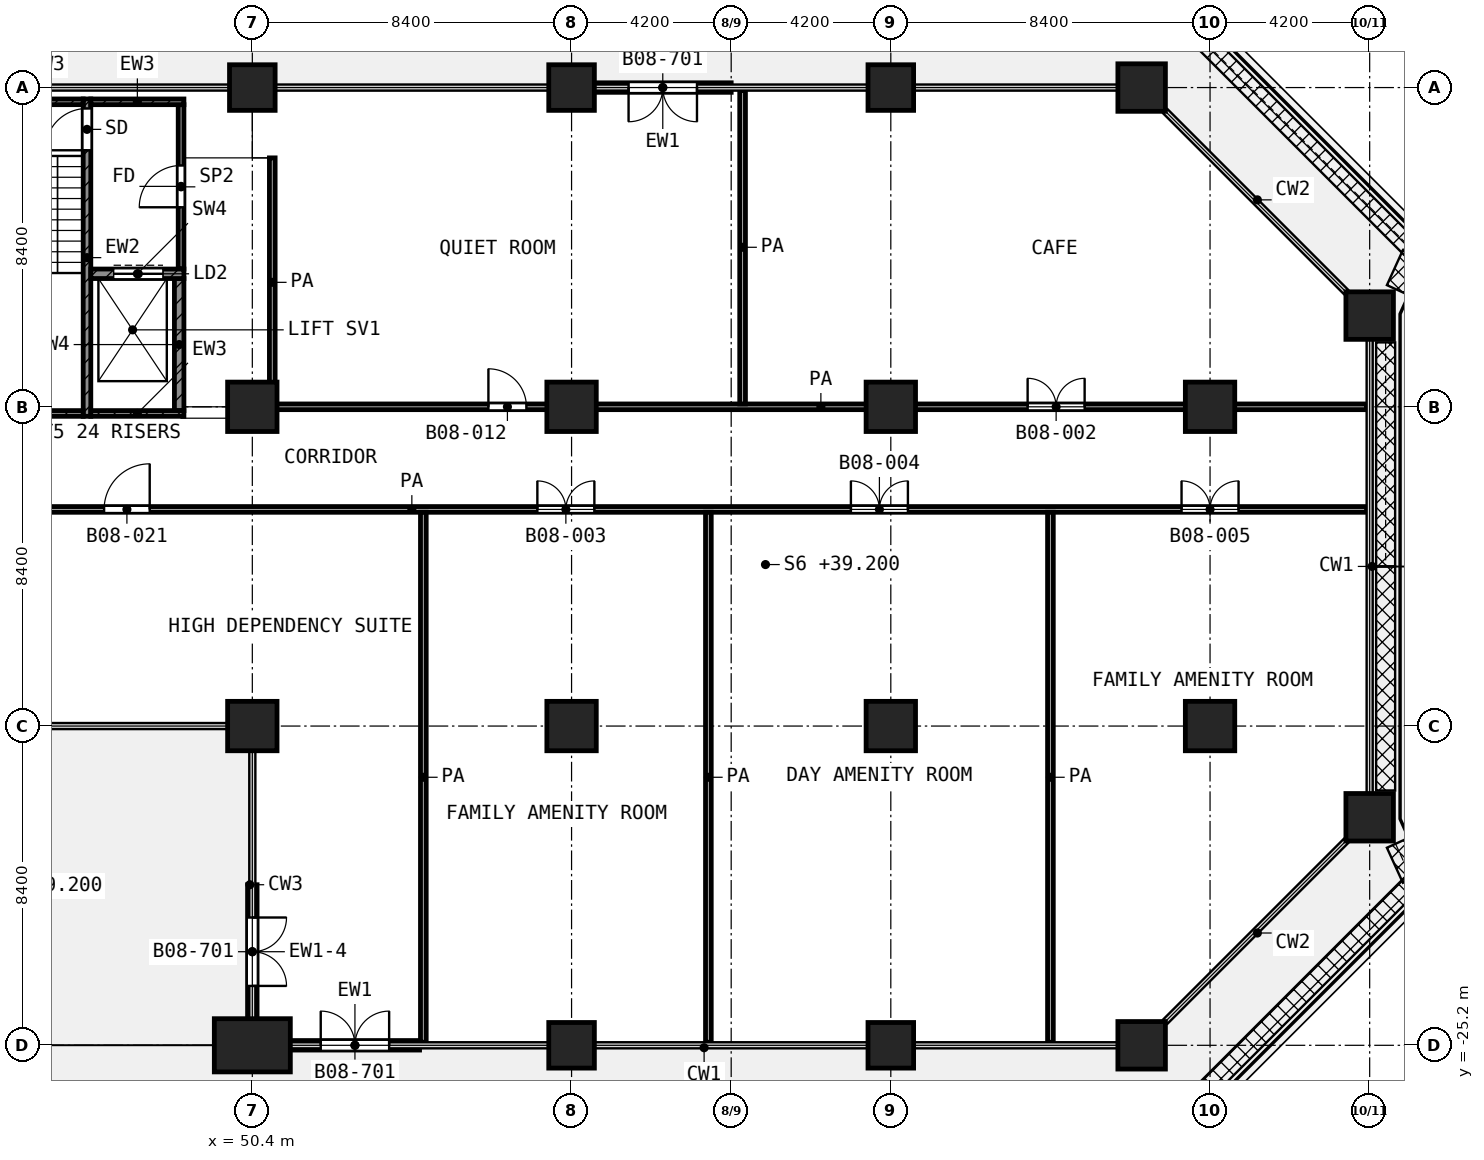
"""IFC4 building model, lengths in metres.
Left out: names, types, materials, properties, quantities, classifications, styles, units other than length and angle.
Written with IfcOpenShell. Run it as: python <this file> out.ifc"""

import sys

from ifc_helpers import new_model, si_unit, direction, frame, frame_2d, origin, origin_2d, place, context, subcontext, project, spatial, rectangle, extrude, element, fill, save


model = new_model("IFC4")
c1 = context("Model", 3, precision=1e-05, world=origin(), true_north=direction((0.0, 1.0)))
c2 = subcontext(c1, "Body", "Model", "MODEL_VIEW")
j1 = project(units=[si_unit("LENGTHUNIT", "METRE"), si_unit("PLANEANGLEUNIT", "RADIAN")], contexts=[c1])
p1 = place(None, origin())
s1 = spatial("IfcSite", under=j1, at=p1, CompositionType="ELEMENT")
p2 = place(p1, origin())
s2 = spatial("IfcBuilding", under=s1, at=p2, CompositionType="ELEMENT")
p3 = place(p2, frame((0.0, 0.0, 39.2)))
s3 = spatial("IfcBuildingStorey", under=s2, at=p3, CompositionType="ELEMENT", Elevation=39.2)
for number, where, z_axis, x_axis in (
    (1, (50.4, 0.0, 0.0), (0.0, 0.0, 1.0), (1.0, 0.0, 0.0)),
    (2, (58.8, 0.0, 0.0), (0.0, 0.0, 1.0), (1.0, 0.0, 0.0)),
    (3, (67.2, 0.0, 0.0), (0.0, 0.0, 1.0), (1.0, 0.0, 0.0)),
):
    element("IfcColumn", number, at=place(p3, frame(where, z_axis=z_axis, x_axis=x_axis)), inside=s3, PredefinedType="COLUMN", context=c2, shape_type="SweptSolid", body=[
        extrude(rectangle(XDim=1.2, YDim=1.2, at=origin_2d()), origin(), (0.0, 0.0, 1.0), 4.2),
    ])
for number, where, z_axis, x_axis in (
    (4, (73.8, 0.0, 0.0), (0.0, 0.0, 1.0), (1.0, 0.0, 0.0)),
    (5, (79.8, -6.0, 0.0), (0.0, 0.0, 1.0), (1.0, 0.0, 0.0)),
):
    element("IfcColumn", number, at=place(p3, frame(where, z_axis=z_axis, x_axis=x_axis)), inside=s3, PredefinedType="COLUMN", context=c2, shape_type="SweptSolid", body=[
        extrude(rectangle(XDim=1.25, YDim=1.25, at=origin_2d()), origin(), (0.0, 0.0, 1.0), 4.2),
    ])
for number, where, z_axis, x_axis in (
    (6, (50.4, -8.4, 0.0), (0.0, 0.0, 1.0), (1.0, 0.0, 0.0)),
    (7, (58.8, -8.4, 0.0), (0.0, 0.0, 1.0), (1.0, 0.0, 0.0)),
    (8, (67.2, -8.4, 0.0), (0.0, 0.0, 1.0), (1.0, 0.0, 0.0)),
    (9, (75.6, -8.4, 0.0), (0.0, 0.0, 1.0), (1.0, 0.0, 0.0)),
    (10, (50.4, -16.8, 0.0), (0.0, 0.0, 1.0), (1.0, 0.0, 0.0)),
    (11, (58.8, -16.8, 0.0), (0.0, 0.0, 1.0), (1.0, 0.0, 0.0)),
    (12, (67.2, -16.8, 0.0), (0.0, 0.0, 1.0), (1.0, 0.0, 0.0)),
    (13, (75.6, -16.8, 0.0), (0.0, 0.0, 1.0), (1.0, 0.0, 0.0)),
):
    element("IfcColumn", number, at=place(p3, frame(where, z_axis=z_axis, x_axis=x_axis)), inside=s3, PredefinedType="COLUMN", context=c2, shape_type="SweptSolid", body=[
        extrude(rectangle(XDim=1.3, YDim=1.3, at=origin_2d()), origin(), (0.0, 0.0, 1.0), 4.2),
    ])
p4 = place(p3, frame((79.8, -19.2, 0.0), z_axis=(0.0, 0.0, 1.0), x_axis=(1.0, 0.0, 0.0)))
e14 = element("IfcColumn", 14, at=p4, inside=s3, PredefinedType="COLUMN", context=c2, shape_type="SweptSolid", body=[
    extrude(rectangle(XDim=1.25, YDim=1.25, at=origin_2d()), origin(), (0.0, 0.0, 1.0), 4.2),
])
p5 = place(p3, frame((50.4, -25.2, 0.0), z_axis=(0.0, 0.0, 1.0), x_axis=(-1.0, 0.0, 0.0)))
e15 = element("IfcColumn", 15, at=p5, inside=s3, PredefinedType="COLUMN", context=c2, shape_type="SweptSolid", body=[
    extrude(rectangle(XDim=2.0, YDim=1.4, at=origin_2d()), origin(), (0.0, 0.0, 1.0), 4.2),
])
for number, where, z_axis, x_axis in (
    (16, (58.8, -25.2, 0.0), (0.0, 0.0, 1.0), (1.0, 0.0, 0.0)),
    (17, (67.2, -25.2, 0.0), (0.0, 0.0, 1.0), (1.0, 0.0, 0.0)),
):
    element("IfcColumn", number, at=place(p3, frame(where, z_axis=z_axis, x_axis=x_axis)), inside=s3, PredefinedType="COLUMN", context=c2, shape_type="SweptSolid", body=[
        extrude(rectangle(XDim=1.2, YDim=1.2, at=origin_2d()), origin(), (0.0, 0.0, 1.0), 4.2),
    ])
p6 = place(p3, frame((73.8, -25.2, 0.0), z_axis=(0.0, 0.0, 1.0), x_axis=(1.0, 0.0, 0.0)))
e18 = element("IfcColumn", 18, at=p6, inside=s3, PredefinedType="COLUMN", context=c2, shape_type="SweptSolid", body=[
    extrude(rectangle(XDim=1.25, YDim=1.25, at=origin_2d()), origin(), (0.0, 0.0, 1.0), 4.2),
])
p7 = place(p3, frame((50.4, -20.975, 0.0), z_axis=(0.0, 0.0, 1.0), x_axis=(0.0, -1.0, 0.0)))
e19 = element("IfcWall", 19, at=p7, inside=s3, PredefinedType="SOLIDWALL", context=c2, shape_type="SweptSolid", body=[
    extrude(rectangle(XDim=3.525, YDim=0.25, at=frame_2d((1.762, 0.0))), origin(), (0.0, 0.0, 1.0), 3.76),
])
p8 = place(p7, frame((0.863, 0.0, 0.0)))
e20 = element("IfcOpeningElement", 20, at=p8, cuts=e19, PredefinedType="OPENING", context=c2, shape_type="SweptSolid", body=[
    extrude(rectangle(XDim=1.8, YDim=2.1, at=frame_2d((0.9, 1.05))), frame((0.0, 0.135, 0.0), z_axis=(0.0, -1.0, 0.0), x_axis=(1.0, 0.0, 0.0)), (0.0, 0.0, 1.0), 0.27),
])
p9 = place(p3, frame((51.4, -25.2, 0.0), z_axis=(0.0, 0.0, 1.0), x_axis=(1.0, 0.0, 0.0)))
e21 = element("IfcWall", 21, at=p9, inside=s3, PredefinedType="SOLIDWALL", context=c2, shape_type="SweptSolid", body=[
    extrude(rectangle(XDim=3.4, YDim=0.25, at=frame_2d((1.7, 0.0))), origin(), (0.0, 0.0, 1.0), 3.78),
])
p10 = place(p9, frame((0.8, 0.0, 0.0)))
e22 = element("IfcOpeningElement", 22, at=p10, cuts=e21, PredefinedType="OPENING", context=c2, shape_type="SweptSolid", body=[
    extrude(rectangle(XDim=1.8, YDim=2.1, at=frame_2d((0.9, 1.05))), frame((0.0, 0.135, 0.0), z_axis=(0.0, -1.0, 0.0), x_axis=(1.0, 0.0, 0.0)), (0.0, 0.0, 1.0), 0.27),
])
p11 = place(p3, frame((63.0, 0.0, 0.0), z_axis=(0.0, 0.0, 1.0), x_axis=(-1.0, 0.0, 0.0)))
e23 = element("IfcWall", 23, at=p11, inside=s3, PredefinedType="SOLIDWALL", context=c2, shape_type="SweptSolid", body=[
    extrude(rectangle(XDim=3.6, YDim=0.25, at=frame_2d((1.8, 0.0))), origin(), (0.0, 0.0, 1.0), 3.78),
])
p12 = place(p11, frame((0.9, 0.0, 0.0)))
e24 = element("IfcOpeningElement", 24, at=p12, cuts=e23, PredefinedType="OPENING", context=c2, shape_type="SweptSolid", body=[
    extrude(rectangle(XDim=1.8, YDim=2.1, at=frame_2d((0.9, 1.05))), frame((0.0, 0.135, 0.0), z_axis=(0.0, -1.0, 0.0), x_axis=(1.0, 0.0, 0.0)), (0.0, 0.0, 1.0), 0.27),
])
p13 = place(p3, frame((46.05, -8.65, 0.0), z_axis=(0.0, 0.0, 1.0), x_axis=(0.0, 1.0, 0.0)))
e25 = element("IfcWall", 25, at=p13, inside=s3, PredefinedType="SHEAR", context=c2, shape_type="SweptSolid", body=[
    extrude(rectangle(XDim=8.35, YDim=0.2, at=frame_2d((4.175, 0.0))), origin(), (0.0, 0.0, 1.0), 3.9),
])
p14 = place(p13, frame((7.0, 0.0, 0.0)))
e26 = element("IfcOpeningElement", 26, at=p14, cuts=e25, PredefinedType="OPENING", context=c2, shape_type="SweptSolid", body=[
    extrude(rectangle(XDim=1.1, YDim=2.1, at=frame_2d((0.55, 1.05))), frame((0.0, 0.11, 0.0), z_axis=(0.0, -1.0, 0.0), x_axis=(1.0, 0.0, 0.0)), (0.0, 0.0, 1.0), 0.22),
])
p15 = place(p3, frame((43.1, -0.375, 0.0), z_axis=(0.0, 0.0, 1.0), x_axis=(1.0, 0.0, 0.0)))
e27 = element("IfcWall", 27, at=p15, inside=s3, PredefinedType="SHEAR", context=c2, shape_type="SweptSolid", body=[
    extrude(rectangle(XDim=2.85, YDim=0.15, at=frame_2d((1.425, 0.0))), origin(), (0.0, 0.0, 1.0), 3.9),
])
p16 = place(p3, frame((46.15, -0.375, 0.0), z_axis=(0.0, 0.0, 1.0), x_axis=(1.0, 0.0, 0.0)))
e28 = element("IfcWall", 28, at=p16, inside=s3, PredefinedType="SHEAR", context=c2, shape_type="SweptSolid", body=[
    extrude(rectangle(XDim=2.45, YDim=0.15, at=frame_2d((1.225, 0.0))), origin(), (0.0, 0.0, 1.0), 3.9),
])
p17 = place(p3, frame((43.1, -8.575, 0.0), z_axis=(0.0, 0.0, 1.0), x_axis=(1.0, 0.0, 0.0)))
e29 = element("IfcWall", 29, at=p17, inside=s3, PredefinedType="SHEAR", context=c2, shape_type="SweptSolid", body=[
    extrude(rectangle(XDim=2.85, YDim=0.15, at=frame_2d((1.425, 0.0))), origin(), (0.0, 0.0, 1.0), 3.9),
])
p18 = place(p3, frame((46.15, -8.575, 0.0), z_axis=(0.0, 0.0, 1.0), x_axis=(1.0, 0.0, 0.0)))
e30 = element("IfcWall", 30, at=p18, inside=s3, PredefinedType="SHEAR", context=c2, shape_type="SweptSolid", body=[
    extrude(rectangle(XDim=2.45, YDim=0.15, at=frame_2d((1.225, 0.0))), origin(), (0.0, 0.0, 1.0), 3.9),
])
p19 = place(p3, frame((46.15, -4.9, 0.0), z_axis=(0.0, 0.0, 1.0), x_axis=(1.0, 0.0, 0.0)))
e31 = element("IfcWall", 31, at=p19, inside=s3, PredefinedType="SHEAR", context=c2, shape_type="SweptSolid", body=[
    extrude(rectangle(XDim=2.45, YDim=0.25, at=frame_2d((1.225, 0.0))), origin(), (0.0, 0.0, 1.0), 3.9),
])
p20 = place(p19, frame((0.6, 0.0, 0.0)))
e32 = element("IfcOpeningElement", 32, at=p20, cuts=e31, PredefinedType="OPENING", context=c2, shape_type="SweptSolid", body=[
    extrude(rectangle(XDim=1.3, YDim=2.1, at=frame_2d((0.65, 1.05))), frame((0.0, 0.135, 0.0), z_axis=(0.0, -1.0, 0.0), x_axis=(1.0, 0.0, 0.0)), (0.0, 0.0, 1.0), 0.27),
])
p21 = place(p3, frame((48.475, -8.5, 0.0), z_axis=(0.0, 0.0, 1.0), x_axis=(0.0, 1.0, 0.0)))
e33 = element("IfcWall", 33, at=p21, inside=s3, PredefinedType="SHEAR", context=c2, shape_type="SweptSolid", body=[
    extrude(rectangle(XDim=3.475, YDim=0.25, at=frame_2d((1.738, 0.0))), origin(), (0.0, 0.0, 1.0), 3.9),
])
p22 = place(p3, frame((48.525, -4.775, 0.0), z_axis=(0.0, 0.0, 1.0), x_axis=(0.0, 1.0, 0.0)))
e34 = element("IfcWall", 34, at=p22, inside=s3, PredefinedType="PARTITIONING", context=c2, shape_type="SweptSolid", body=[
    extrude(rectangle(XDim=4.325, YDim=0.15, at=frame_2d((2.163, 0.0))), origin(), (0.0, 0.0, 1.0), 3.9),
])
p23 = place(p22, frame((1.625, 0.0, 0.0)))
e35 = element("IfcOpeningElement", 35, at=p23, cuts=e34, PredefinedType="OPENING", context=c2, shape_type="SweptSolid", body=[
    extrude(rectangle(XDim=1.1, YDim=2.1, at=frame_2d((0.55, 1.05))), frame((0.0, 0.085, 0.0), z_axis=(0.0, -1.0, 0.0), x_axis=(1.0, 0.0, 0.0)), (0.0, 0.0, 1.0), 0.17),
])
p24 = place(p3, frame((29.475, -11.1, 0.0), z_axis=(0.0, 0.0, 1.0), x_axis=(1.0, 0.0, 0.0)))
e36 = element("IfcWall", 36, at=p24, inside=s3, PredefinedType="PARTITIONING", context=c2, shape_type="SweptSolid", body=[
    extrude(rectangle(XDim=50.245, YDim=0.15, at=frame_2d((25.123, 0.0))), origin(), (0.0, 0.0, 1.0), 3.9),
])
p25 = place(p24, frame((17.025, 0.0, 0.0)))
e37 = element("IfcOpeningElement", 37, at=p25, cuts=e36, PredefinedType="OPENING", context=c2, shape_type="SweptSolid", body=[
    extrude(rectangle(XDim=1.2, YDim=2.1, at=frame_2d((0.6, 1.05))), frame((0.0, 0.085, 0.0), z_axis=(0.0, -1.0, 0.0), x_axis=(1.0, 0.0, 0.0)), (0.0, 0.0, 1.0), 0.17),
])
p26 = place(p24, frame((9.225, 0.0, 0.0)))
e38 = element("IfcOpeningElement", 38, at=p26, cuts=e36, PredefinedType="OPENING", context=c2, shape_type="SweptSolid", body=[
    extrude(rectangle(XDim=1.2, YDim=2.1, at=frame_2d((0.6, 1.05))), frame((0.0, 0.085, 0.0), z_axis=(0.0, -1.0, 0.0), x_axis=(1.0, 0.0, 0.0)), (0.0, 0.0, 1.0), 0.17),
])
p27 = place(p24, frame((28.425, 0.0, 0.0)))
e39 = element("IfcOpeningElement", 39, at=p27, cuts=e36, PredefinedType="OPENING", context=c2, shape_type="SweptSolid", body=[
    extrude(rectangle(XDim=1.5, YDim=2.1, at=frame_2d((0.75, 1.05))), frame((0.0, 0.085, 0.0), z_axis=(0.0, -1.0, 0.0), x_axis=(1.0, 0.0, 0.0)), (0.0, 0.0, 1.0), 0.17),
])
p28 = place(p24, frame((36.675, 0.0, 0.0)))
e40 = element("IfcOpeningElement", 40, at=p28, cuts=e36, PredefinedType="OPENING", context=c2, shape_type="SweptSolid", body=[
    extrude(rectangle(XDim=1.5, YDim=2.1, at=frame_2d((0.75, 1.05))), frame((0.0, 0.085, 0.0), z_axis=(0.0, -1.0, 0.0), x_axis=(1.0, 0.0, 0.0)), (0.0, 0.0, 1.0), 0.17),
])
p29 = place(p24, frame((45.375, 0.0, 0.0)))
e41 = element("IfcOpeningElement", 41, at=p29, cuts=e36, PredefinedType="OPENING", context=c2, shape_type="SweptSolid", body=[
    extrude(rectangle(XDim=1.5, YDim=2.1, at=frame_2d((0.75, 1.05))), frame((0.0, 0.085, 0.0), z_axis=(0.0, -1.0, 0.0), x_axis=(1.0, 0.0, 0.0)), (0.0, 0.0, 1.0), 0.17),
])
p30 = place(p3, frame((51.0, -8.4, 0.0), z_axis=(0.0, 0.0, 1.0), x_axis=(1.0, 0.0, 0.0)))
e42 = element("IfcWall", 42, at=p30, inside=s3, PredefinedType="PARTITIONING", context=c2, shape_type="SweptSolid", body=[
    extrude(rectangle(XDim=28.72, YDim=0.15, at=frame_2d((14.36, 0.0))), origin(), (0.0, 0.0, 1.0), 3.9),
])
p31 = place(p30, frame((5.612, 0.0, 0.0)))
e43 = element("IfcOpeningElement", 43, at=p31, cuts=e42, PredefinedType="OPENING", context=c2, shape_type="SweptSolid", body=[
    extrude(rectangle(XDim=1.0, YDim=2.1, at=frame_2d((0.5, 1.05))), frame((0.0, 0.085, 0.0), z_axis=(0.0, -1.0, 0.0), x_axis=(1.0, 0.0, 0.0)), (0.0, 0.0, 1.0), 0.17),
])
p32 = place(p30, frame((19.8, 0.0, 0.0)))
e44 = element("IfcOpeningElement", 44, at=p32, cuts=e42, PredefinedType="OPENING", context=c2, shape_type="SweptSolid", body=[
    extrude(rectangle(XDim=1.5, YDim=2.1, at=frame_2d((0.75, 1.05))), frame((0.0, 0.085, 0.0), z_axis=(0.0, -1.0, 0.0), x_axis=(1.0, 0.0, 0.0)), (0.0, 0.0, 1.0), 0.17),
])
p33 = place(p3, frame((50.925, -8.4, 0.0), z_axis=(0.0, 0.0, 1.0), x_axis=(0.0, 1.0, 0.0)))
e45 = element("IfcWall", 45, at=p33, inside=s3, PredefinedType="PARTITIONING", context=c2, shape_type="SweptSolid", body=[
    extrude(rectangle(XDim=6.55, YDim=0.15, at=frame_2d((3.275, 0.0))), origin(), (0.0, 0.0, 1.0), 3.9),
])
for number, where, z_axis, x_axis in (
    (46, (54.9, -25.12, 0.0), (0.0, 0.0, 1.0), (0.0, 1.0, 0.0)),
    (47, (62.4, -25.12, 0.0), (0.0, 0.0, 1.0), (0.0, 1.0, 0.0)),
):
    element("IfcWall", number, at=place(p3, frame(where, z_axis=z_axis, x_axis=x_axis)), inside=s3, PredefinedType="PARTITIONING", context=c2, shape_type="SweptSolid", body=[
        extrude(rectangle(XDim=13.945, YDim=0.15, at=frame_2d((6.973, 0.0))), origin(), (0.0, 0.0, 1.0), 3.9),
    ])
p34 = place(p3, frame((63.3, -8.325, 0.0), z_axis=(0.0, 0.0, 1.0), x_axis=(0.0, 1.0, 0.0)))
e48 = element("IfcWall", 48, at=p34, inside=s3, PredefinedType="PARTITIONING", context=c2, shape_type="SweptSolid", body=[
    extrude(rectangle(XDim=8.245, YDim=0.15, at=frame_2d((4.123, 0.0))), origin(), (0.0, 0.0, 1.0), 3.9),
])
p35 = place(p3, frame((71.4, -25.12, 0.0), z_axis=(0.0, 0.0, 1.0), x_axis=(0.0, 1.0, 0.0)))
e49 = element("IfcWall", 49, at=p35, inside=s3, PredefinedType="PARTITIONING", context=c2, shape_type="SweptSolid", body=[
    extrude(rectangle(XDim=13.945, YDim=0.15, at=frame_2d((6.973, 0.0))), origin(), (0.0, 0.0, 1.0), 3.9),
])
p36 = place(p8, origin())
e50 = element("IfcDoor", 50, at=p36, inside=s3, OperationType="DOUBLE_DOOR_SINGLE_SWING", PredefinedType="DOOR", context=c2, shape_type="SweptSolid", body=[
    extrude(rectangle(XDim=1.8, YDim=2.1, at=frame_2d((0.9, 1.05))), frame((0.0, 0.025, 0.0), z_axis=(0.0, -1.0, 0.0), x_axis=(1.0, 0.0, 0.0)), (0.0, 0.0, 1.0), 0.05),
])
fill(e20, e50)
p37 = place(p10, origin())
e51 = element("IfcDoor", 51, at=p37, inside=s3, OperationType="DOUBLE_DOOR_SINGLE_SWING", PredefinedType="DOOR", context=c2, shape_type="SweptSolid", body=[
    extrude(rectangle(XDim=1.8, YDim=2.1, at=frame_2d((0.9, 1.05))), frame((0.0, 0.025, 0.0), z_axis=(0.0, -1.0, 0.0), x_axis=(1.0, 0.0, 0.0)), (0.0, 0.0, 1.0), 0.05),
])
fill(e22, e51)
p38 = place(p12, origin())
e52 = element("IfcDoor", 52, at=p38, inside=s3, OperationType="DOUBLE_DOOR_SINGLE_SWING", PredefinedType="DOOR", context=c2, shape_type="SweptSolid", body=[
    extrude(rectangle(XDim=1.8, YDim=2.1, at=frame_2d((0.9, 1.05))), frame((0.0, 0.025, 0.0), z_axis=(0.0, -1.0, 0.0), x_axis=(1.0, 0.0, 0.0)), (0.0, 0.0, 1.0), 0.05),
])
fill(e24, e52)
p39 = place(p14, origin())
e53 = element("IfcDoor", 53, at=p39, inside=s3, OperationType="SINGLE_SWING_LEFT", PredefinedType="DOOR", context=c2, shape_type="SweptSolid", body=[
    extrude(rectangle(XDim=1.1, YDim=2.1, at=frame_2d((0.55, 1.05))), frame((0.0, 0.025, 0.0), z_axis=(0.0, -1.0, 0.0), x_axis=(1.0, 0.0, 0.0)), (0.0, 0.0, 1.0), 0.05),
])
fill(e26, e53)
p40 = place(p20, origin())
e54 = element("IfcDoor", 54, at=p40, inside=s3, OperationType="DOUBLE_DOOR_SLIDING", PredefinedType="DOOR", context=c2, shape_type="SweptSolid", body=[
    extrude(rectangle(XDim=1.3, YDim=2.1, at=frame_2d((0.65, 1.05))), frame((0.0, 0.025, 0.0), z_axis=(0.0, -1.0, 0.0), x_axis=(1.0, 0.0, 0.0)), (0.0, 0.0, 1.0), 0.05),
])
fill(e32, e54)
p41 = place(p23, origin())
e55 = element("IfcDoor", 55, at=p41, inside=s3, OperationType="SINGLE_SWING_LEFT", PredefinedType="DOOR", context=c2, shape_type="SweptSolid", body=[
    extrude(rectangle(XDim=1.1, YDim=2.1, at=frame_2d((0.55, 1.05))), frame((0.0, 0.025, 0.0), z_axis=(0.0, -1.0, 0.0), x_axis=(1.0, 0.0, 0.0)), (0.0, 0.0, 1.0), 0.05),
])
fill(e35, e55)
p42 = place(p31, origin())
e56 = element("IfcDoor", 56, at=p42, inside=s3, OperationType="SINGLE_SWING_LEFT", PredefinedType="DOOR", context=c2, shape_type="SweptSolid", body=[
    extrude(rectangle(XDim=1.0, YDim=2.1, at=frame_2d((0.5, 1.05))), frame((0.0, 0.025, 0.0), z_axis=(0.0, -1.0, 0.0), x_axis=(1.0, 0.0, 0.0)), (0.0, 0.0, 1.0), 0.05),
])
fill(e43, e56)
p43 = place(p32, origin())
e57 = element("IfcDoor", 57, at=p43, inside=s3, OperationType="DOUBLE_DOOR_SINGLE_SWING", PredefinedType="DOOR", context=c2, shape_type="SweptSolid", body=[
    extrude(rectangle(XDim=1.5, YDim=2.1, at=frame_2d((0.75, 1.05))), frame((0.0, 0.025, 0.0), z_axis=(0.0, -1.0, 0.0), x_axis=(1.0, 0.0, 0.0)), (0.0, 0.0, 1.0), 0.05),
])
fill(e44, e57)
p44 = place(p25, origin())
e58 = element("IfcDoor", 58, at=p44, inside=s3, OperationType="SINGLE_SWING_RIGHT", PredefinedType="DOOR", context=c2, shape_type="SweptSolid", body=[
    extrude(rectangle(XDim=1.2, YDim=2.1, at=frame_2d((0.6, 1.05))), frame((0.0, 0.025, 0.0), z_axis=(0.0, -1.0, 0.0), x_axis=(1.0, 0.0, 0.0)), (0.0, 0.0, 1.0), 0.05),
])
fill(e37, e58)
p45 = place(p27, origin())
e59 = element("IfcDoor", 59, at=p45, inside=s3, OperationType="DOUBLE_DOOR_SINGLE_SWING", PredefinedType="DOOR", context=c2, shape_type="SweptSolid", body=[
    extrude(rectangle(XDim=1.5, YDim=2.1, at=frame_2d((0.75, 1.05))), frame((0.0, 0.025, 0.0), z_axis=(0.0, -1.0, 0.0), x_axis=(1.0, 0.0, 0.0)), (0.0, 0.0, 1.0), 0.05),
])
fill(e39, e59)
p46 = place(p28, origin())
e60 = element("IfcDoor", 60, at=p46, inside=s3, OperationType="DOUBLE_DOOR_SINGLE_SWING", PredefinedType="DOOR", context=c2, shape_type="SweptSolid", body=[
    extrude(rectangle(XDim=1.5, YDim=2.1, at=frame_2d((0.75, 1.05))), frame((0.0, 0.025, 0.0), z_axis=(0.0, -1.0, 0.0), x_axis=(1.0, 0.0, 0.0)), (0.0, 0.0, 1.0), 0.05),
])
fill(e40, e60)
p47 = place(p29, origin())
e61 = element("IfcDoor", 61, at=p47, inside=s3, OperationType="DOUBLE_DOOR_SINGLE_SWING", PredefinedType="DOOR", context=c2, shape_type="SweptSolid", body=[
    extrude(rectangle(XDim=1.5, YDim=2.1, at=frame_2d((0.75, 1.05))), frame((0.0, 0.025, 0.0), z_axis=(0.0, -1.0, 0.0), x_axis=(1.0, 0.0, 0.0)), (0.0, 0.0, 1.0), 0.05),
])
fill(e41, e61)
save(model, sys.argv[1])
